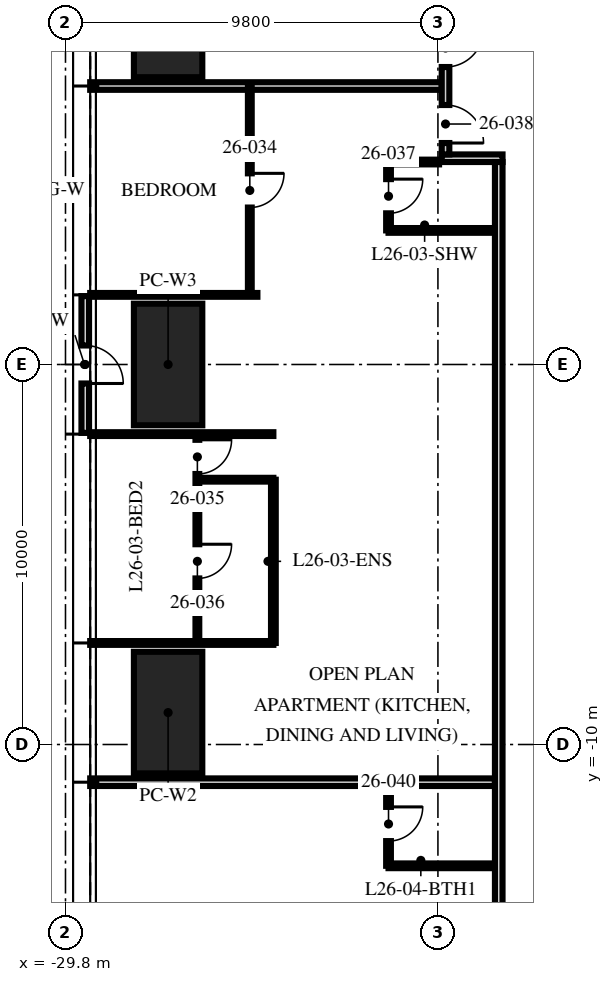
"""IFC4 building model, lengths in metres.
Left out: names, types, materials, properties, quantities, classifications, styles, units other than length and angle.
Written with IfcOpenShell. Run it as: python <this file> out.ifc"""

import sys

from ifc_helpers import new_model, si_unit, direction, frame, frame_2d, origin, origin_2d, place, context, subcontext, project, spatial, rectangle, hollow_rectangle, extrude, element, fill, save


model = new_model("IFC4")
c1 = context("Model", 3, precision=1e-05, world=origin(), true_north=direction((0.0, 1.0)))
c2 = subcontext(c1, "Body", "Model", "MODEL_VIEW")
j1 = project(units=[si_unit("LENGTHUNIT", "METRE"), si_unit("PLANEANGLEUNIT", "RADIAN")], contexts=[c1])
p1 = place(None, origin())
s1 = spatial("IfcSite", under=j1, at=p1, CompositionType="ELEMENT")
p2 = place(p1, origin())
s2 = spatial("IfcBuilding", under=s1, at=p2, CompositionType="ELEMENT")
p3 = place(p2, frame((0.0, 0.0, 107.25)))
s3 = spatial("IfcBuildingStorey", under=s2, at=p3, CompositionType="ELEMENT", Elevation=107.25)
p4 = place(p3, frame((-27.1, -9.16, -0.07), z_axis=(0.0, 0.0, 1.0), x_axis=(0.0, 1.0, 0.0)))
e1 = element("IfcColumn", 1, at=p4, inside=s3, PredefinedType="COLUMN", context=c2, shape_type="SweptSolid", body=[
    extrude(hollow_rectangle(XDim=3.2, YDim=1.8, WallThickness=0.2, at=origin_2d()), origin(), (0.0, 0.0, 1.0), 3.82),
])
p5 = place(p3, frame((-27.1, 0.0, -0.23), z_axis=(0.0, 0.0, 1.0), x_axis=(0.0, 1.0, 0.0)))
e2 = element("IfcColumn", 2, at=p5, inside=s3, PredefinedType="COLUMN", context=c2, shape_type="SweptSolid", body=[
    extrude(hollow_rectangle(XDim=3.2, YDim=1.8, WallThickness=0.2, at=origin_2d()), origin(), (0.0, 0.0, 1.0), 3.98),
])
p6 = place(p3, frame((-27.1, 9.16, -0.07), z_axis=(0.0, 0.0, 1.0), x_axis=(0.0, 1.0, 0.0)))
e3 = element("IfcColumn", 3, at=p6, inside=s3, PredefinedType="COLUMN", context=c2, shape_type="SweptSolid", body=[
    extrude(hollow_rectangle(XDim=3.2, YDim=1.8, WallThickness=0.2, at=origin_2d()), origin(), (0.0, 0.0, 1.0), 3.82),
])
p7 = place(p3, frame((-29.28, 1.8, 0.0), z_axis=(0.0, 0.0, 1.0), x_axis=(0.0, -1.0, 0.0)))
e4 = element("IfcWall", 4, at=p7, inside=s3, PredefinedType="ELEMENTEDWALL", context=c2, shape_type="SweptSolid", body=[
    extrude(rectangle(XDim=3.599, YDim=0.2, at=frame_2d((1.8, 0.0))), origin(), (0.0, 0.0, 1.0), 3.75),
])
p8 = place(p7, frame((1.3, 0.0, 0.0)))
e5 = element("IfcOpeningElement", 5, at=p8, cuts=e4, PredefinedType="OPENING", context=c2, shape_type="SweptSolid", body=[
    extrude(rectangle(XDim=1.0, YDim=2.4, at=frame_2d((0.5, 1.2))), frame((0.0, 0.11, 0.0), z_axis=(0.0, -1.0, 0.0), x_axis=(1.0, 0.0, 0.0)), (0.0, 0.0, 1.0), 0.22),
])
p9 = place(p3, frame((-19.9, 7.328, 0.0), z_axis=(0.0, 0.0, 1.0), x_axis=(-1.0, 0.0, 0.0)))
e6 = element("IfcWall", 6, at=p9, inside=s3, PredefinedType="PARTITIONING", context=c2, shape_type="SweptSolid", body=[
    extrude(rectangle(XDim=9.25, YDim=0.2, at=frame_2d((4.625, 0.0))), origin(), (0.0, 0.0, 1.0), 2.81),
])
p10 = place(p3, frame((-24.75, 1.832, 0.0), z_axis=(0.0, 0.0, 1.0), x_axis=(-1.0, 0.0, 0.0)))
e7 = element("IfcWall", 7, at=p10, inside=s3, PredefinedType="PARTITIONING", context=c2, shape_type="SweptSolid", body=[
    extrude(rectangle(XDim=4.4, YDim=0.1, at=frame_2d((2.2, 0.0))), origin(), (0.0, 0.0, 1.0), 2.81),
])
for number, where, z_axis, x_axis in (
    (8, (-24.33, -1.832, 0.0), (0.0, 0.0, 1.0), (-1.0, 0.0, 0.0)),
    (9, (-24.33, -7.328, 0.0), (0.0, 0.0, 1.0), (-1.0, 0.0, 0.0)),
):
    element("IfcWall", number, at=place(p3, frame(where, z_axis=z_axis, x_axis=x_axis)), inside=s3, PredefinedType="PARTITIONING", context=c2, shape_type="SweptSolid", body=[
        extrude(rectangle(XDim=4.82, YDim=0.1, at=frame_2d((2.41, 0.0))), origin(), (0.0, 0.0, 1.0), 2.81),
    ])
p11 = place(p3, frame((-18.5, -10.992, 0.0), z_axis=(0.0, 0.0, 1.0), x_axis=(-1.0, 0.0, 0.0)))
e10 = element("IfcWall", 10, at=p11, inside=s3, PredefinedType="PARTITIONING", context=c2, shape_type="SweptSolid", body=[
    extrude(rectangle(XDim=10.65, YDim=0.2, at=frame_2d((5.325, 0.0))), origin(), (0.0, 0.0, 1.0), 2.81),
])
p12 = place(p3, frame((-24.95, 7.328, 0.0), z_axis=(0.0, 0.0, 1.0), x_axis=(0.0, -1.0, 0.0)))
e11 = element("IfcWall", 11, at=p12, inside=s3, PredefinedType="PARTITIONING", context=c2, shape_type="SweptSolid", body=[
    extrude(rectangle(XDim=5.496, YDim=0.1, at=frame_2d((2.748, 0.0))), origin(), (0.0, 0.0, 1.0), 2.81),
])
p13 = place(p12, frame((2.298, 0.0, 0.0)))
e12 = element("IfcOpeningElement", 12, at=p13, cuts=e11, PredefinedType="OPENING", context=c2, shape_type="SweptSolid", body=[
    extrude(rectangle(XDim=0.9, YDim=2.1, at=frame_2d((0.45, 1.05))), frame((0.0, 0.06, 0.0), z_axis=(0.0, -1.0, 0.0), x_axis=(1.0, 0.0, 0.0)), (0.0, 0.0, 1.0), 0.12),
])
p14 = place(p3, frame((-26.33, -1.832, 0.0), z_axis=(0.0, 0.0, 1.0), x_axis=(0.0, -1.0, 0.0)))
e13 = element("IfcWall", 13, at=p14, inside=s3, PredefinedType="PARTITIONING", context=c2, shape_type="SweptSolid", body=[
    extrude(rectangle(XDim=5.496, YDim=0.1, at=frame_2d((2.748, 0.0))), origin(), (0.0, 0.0, 1.0), 2.81),
])
p15 = place(p14, frame((0.15, 0.0, 0.0)))
e14 = element("IfcOpeningElement", 14, at=p15, cuts=e13, PredefinedType="OPENING", context=c2, shape_type="SweptSolid", body=[
    extrude(rectangle(XDim=0.9, YDim=2.1, at=frame_2d((0.45, 1.05))), frame((0.0, 0.06, 0.0), z_axis=(0.0, -1.0, 0.0), x_axis=(1.0, 0.0, 0.0)), (0.0, 0.0, 1.0), 0.12),
])
p16 = place(p14, frame((2.898, 0.0, 0.0)))
e15 = element("IfcOpeningElement", 15, at=p16, cuts=e13, PredefinedType="OPENING", context=c2, shape_type="SweptSolid", body=[
    extrude(rectangle(XDim=0.9, YDim=2.1, at=frame_2d((0.45, 1.05))), frame((0.0, 0.06, 0.0), z_axis=(0.0, -1.0, 0.0), x_axis=(1.0, 0.0, 0.0)), (0.0, 0.0, 1.0), 0.12),
])
p17 = place(p3, frame((-24.33, -3.032, 0.0), z_axis=(0.0, 0.0, 1.0), x_axis=(-1.0, 0.0, 0.0)))
e16 = element("IfcWall", 16, at=p17, inside=s3, PredefinedType="PARTITIONING", context=c2, shape_type="SweptSolid", body=[
    extrude(rectangle(XDim=2.0, YDim=0.1, at=frame_2d((1.0, 0.0))), origin(), (0.0, 0.0, 1.0), 3.5),
])
p18 = place(p3, frame((-24.33, -3.032, 0.0), z_axis=(0.0, 0.0, 1.0), x_axis=(0.0, -1.0, 0.0)))
e17 = element("IfcWall", 17, at=p18, inside=s3, PredefinedType="PARTITIONING", context=c2, shape_type="SweptSolid", body=[
    extrude(rectangle(XDim=4.296, YDim=0.125, at=frame_2d((2.148, 0.0))), origin(), (0.0, 0.0, 1.0), 2.81),
])
p19 = place(p3, frame((-21.3, 5.328, 0.0), z_axis=(0.0, 0.0, 1.0), x_axis=(0.0, -1.0, 0.0)))
e18 = element("IfcWall", 18, at=p19, inside=s3, PredefinedType="PARTITIONING", context=c2, shape_type="SweptSolid", body=[
    extrude(rectangle(XDim=1.8, YDim=0.125, at=frame_2d((0.9, 0.0))), origin(), (0.0, 0.0, 1.0), 2.81),
])
p20 = place(p19, frame((0.45, 0.0, 0.0)))
e19 = element("IfcOpeningElement", 19, at=p20, cuts=e18, PredefinedType="OPENING", context=c2, shape_type="SweptSolid", body=[
    extrude(rectangle(XDim=0.9, YDim=2.1, at=frame_2d((0.45, 1.05))), frame((0.0, 0.073, 0.0), z_axis=(0.0, -1.0, 0.0), x_axis=(1.0, 0.0, 0.0)), (0.0, 0.0, 1.0), 0.145),
])
p21 = place(p3, frame((-19.97, 5.328, 0.0), z_axis=(0.0, 0.0, 1.0), x_axis=(-1.0, 0.0, 0.0)))
e20 = element("IfcWall", 20, at=p21, inside=s3, PredefinedType="PARTITIONING", context=c2, shape_type="SweptSolid", body=[
    extrude(rectangle(XDim=1.33, YDim=0.125, at=frame_2d((0.665, 0.0))), origin(), (0.0, 0.0, 1.0), 3.5),
])
p22 = place(p3, frame((-18.5, 3.528, 0.0), z_axis=(0.0, 0.0, 1.0), x_axis=(-1.0, 0.0, 0.0)))
e21 = element("IfcWall", 21, at=p22, inside=s3, PredefinedType="PARTITIONING", context=c2, shape_type="SweptSolid", body=[
    extrude(rectangle(XDim=2.8, YDim=0.125, at=frame_2d((1.4, 0.0))), origin(), (0.0, 0.0, 1.0), 3.5),
])
p23 = place(p3, frame((-21.3, -10.992, 0.0), z_axis=(0.0, 0.0, 1.0), x_axis=(0.0, -1.0, 0.0)))
e22 = element("IfcWall", 22, at=p23, inside=s3, PredefinedType="PARTITIONING", context=c2, shape_type="SweptSolid", body=[
    extrude(rectangle(XDim=2.2, YDim=0.125, at=frame_2d((1.1, 0.0))), origin(), (0.0, 0.0, 1.0), 3.5),
])
p24 = place(p23, frame((0.65, 0.0, 0.0)))
e23 = element("IfcOpeningElement", 23, at=p24, cuts=e22, PredefinedType="OPENING", context=c2, shape_type="SweptSolid", body=[
    extrude(rectangle(XDim=0.9, YDim=2.1, at=frame_2d((0.45, 1.05))), frame((0.0, 0.073, 0.0), z_axis=(0.0, -1.0, 0.0), x_axis=(1.0, 0.0, 0.0)), (0.0, 0.0, 1.0), 0.145),
])
p25 = place(p3, frame((-18.5, -13.192, 0.0), z_axis=(0.0, 0.0, 1.0), x_axis=(-1.0, 0.0, 0.0)))
e24 = element("IfcWall", 24, at=p25, inside=s3, PredefinedType="PARTITIONING", context=c2, shape_type="SweptSolid", body=[
    extrude(rectangle(XDim=2.8, YDim=0.125, at=frame_2d((1.4, 0.0))), origin(), (0.0, 0.0, 1.0), 3.5),
])
p26 = place(p3, frame((-18.3, 5.428, 0.0), z_axis=(0.0, 0.0, 1.0), x_axis=(-1.0, 0.0, 0.0)))
e25 = element("IfcWall", 25, at=p26, inside=s3, PredefinedType="PARTITIONING", context=c2, shape_type="SweptSolid", body=[
    extrude(rectangle(XDim=1.6, YDim=0.2, at=frame_2d((0.8, 0.0))), origin(), (0.0, 0.0, 1.0), 3.5),
])
p27 = place(p3, frame((-19.8, 9.128, 0.0), z_axis=(0.0, 0.0, 1.0), x_axis=(0.0, -1.0, 0.0)))
e26 = element("IfcWall", 26, at=p27, inside=s3, PredefinedType="PARTITIONING", context=c2, shape_type="SweptSolid", body=[
    extrude(rectangle(XDim=3.6, YDim=0.2, at=frame_2d((1.8, 0.0))), origin(), (0.0, 0.0, 1.0), 2.7),
])
p28 = place(p27, frame((0.3, 0.0, 0.0)))
e27 = element("IfcOpeningElement", 27, at=p28, cuts=e26, PredefinedType="OPENING", context=c2, shape_type="SweptSolid", body=[
    extrude(rectangle(XDim=1.0, YDim=2.2, at=frame_2d((0.5, 1.1))), frame((0.0, 0.11, 0.0), z_axis=(0.0, -1.0, 0.0), x_axis=(1.0, 0.0, 0.0)), (0.0, 0.0, 1.0), 0.22),
])
p29 = place(p27, frame((2.3, 0.0, 0.0)))
e28 = element("IfcOpeningElement", 28, at=p29, cuts=e26, PredefinedType="OPENING", context=c2, shape_type="SweptSolid", body=[
    extrude(rectangle(XDim=1.0, YDim=2.2, at=frame_2d((0.5, 1.1))), frame((0.0, 0.11, 0.0), z_axis=(0.0, -1.0, 0.0), x_axis=(1.0, 0.0, 0.0)), (0.0, 0.0, 1.0), 0.22),
])
p30 = place(p3, frame((-18.4, 5.328, 0.0), z_axis=(0.0, 0.0, 1.0), x_axis=(0.0, -1.0, 0.0)))
e29 = element("IfcWall", 29, at=p30, inside=s3, PredefinedType="PARTITIONING", context=c2, shape_type="SweptSolid", body=[
    extrude(rectangle(XDim=23.628, YDim=0.2, at=frame_2d((11.814, 0.0))), origin(), (0.0, 0.0, 1.0), 2.3),
])
p31 = place(p30, frame((21.84, 0.0, 0.0)))
e30 = element("IfcOpeningElement", 30, at=p31, cuts=e29, PredefinedType="OPENING", context=c2, shape_type="SweptSolid", body=[
    extrude(rectangle(XDim=1.0, YDim=2.2, at=frame_2d((0.5, 1.1))), frame((0.0, 0.11, 0.0), z_axis=(0.0, -1.0, 0.0), x_axis=(1.0, 0.0, 0.0)), (0.0, 0.0, 1.0), 0.22),
])
p32 = place(p8, origin())
e31 = element("IfcDoor", 31, at=p32, inside=s3, OperationType="SINGLE_SWING_LEFT", PredefinedType="DOOR", context=c2, shape_type="SweptSolid", body=[
    extrude(rectangle(XDim=1.0, YDim=2.4, at=frame_2d((0.5, 1.2))), frame((0.0, 0.025, 0.0), z_axis=(0.0, -1.0, 0.0), x_axis=(1.0, 0.0, 0.0)), (0.0, 0.0, 1.0), 0.05),
])
fill(e5, e31)
p33 = place(p28, origin())
e32 = element("IfcDoor", 32, at=p33, inside=s3, OperationType="SINGLE_SWING_LEFT", PredefinedType="DOOR", context=c2, shape_type="SweptSolid", body=[
    extrude(rectangle(XDim=1.0, YDim=2.2, at=frame_2d((0.5, 1.1))), frame((0.0, 0.025, 0.0), z_axis=(0.0, -1.0, 0.0), x_axis=(1.0, 0.0, 0.0)), (0.0, 0.0, 1.0), 0.05),
])
fill(e27, e32)
p34 = place(p13, origin())
e33 = element("IfcDoor", 33, at=p34, inside=s3, OperationType="SINGLE_SWING_LEFT", PredefinedType="DOOR", context=c2, shape_type="SweptSolid", body=[
    extrude(rectangle(XDim=0.9, YDim=2.1, at=frame_2d((0.45, 1.05))), frame((0.0, 0.025, 0.0), z_axis=(0.0, -1.0, 0.0), x_axis=(1.0, 0.0, 0.0)), (0.0, 0.0, 1.0), 0.05),
])
fill(e12, e33)
p35 = place(p15, origin())
e34 = element("IfcDoor", 34, at=p35, inside=s3, OperationType="SINGLE_SWING_LEFT", PredefinedType="DOOR", context=c2, shape_type="SweptSolid", body=[
    extrude(rectangle(XDim=0.9, YDim=2.1, at=frame_2d((0.45, 1.05))), frame((0.0, 0.025, 0.0), z_axis=(0.0, -1.0, 0.0), x_axis=(1.0, 0.0, 0.0)), (0.0, 0.0, 1.0), 0.05),
])
fill(e14, e34)
p36 = place(p16, origin())
e35 = element("IfcDoor", 35, at=p36, inside=s3, OperationType="SINGLE_SWING_LEFT", PredefinedType="DOOR", context=c2, shape_type="SweptSolid", body=[
    extrude(rectangle(XDim=0.9, YDim=2.1, at=frame_2d((0.45, 1.05))), frame((0.0, 0.025, 0.0), z_axis=(0.0, -1.0, 0.0), x_axis=(1.0, 0.0, 0.0)), (0.0, 0.0, 1.0), 0.05),
])
fill(e15, e35)
p37 = place(p20, origin())
e36 = element("IfcDoor", 36, at=p37, inside=s3, OperationType="SINGLE_SWING_LEFT", PredefinedType="DOOR", context=c2, shape_type="SweptSolid", body=[
    extrude(rectangle(XDim=0.9, YDim=2.1, at=frame_2d((0.45, 1.05))), frame((0.0, 0.025, 0.0), z_axis=(0.0, -1.0, 0.0), x_axis=(1.0, 0.0, 0.0)), (0.0, 0.0, 1.0), 0.05),
])
fill(e19, e36)
p38 = place(p29, origin())
e37 = element("IfcDoor", 37, at=p38, inside=s3, OperationType="SINGLE_SWING_RIGHT", PredefinedType="DOOR", context=c2, shape_type="SweptSolid", body=[
    extrude(rectangle(XDim=1.0, YDim=2.2, at=frame_2d((0.5, 1.1))), frame((0.0, 0.025, 0.0), z_axis=(0.0, -1.0, 0.0), x_axis=(1.0, 0.0, 0.0)), (0.0, 0.0, 1.0), 0.05),
])
fill(e28, e37)
p39 = place(p24, origin())
e38 = element("IfcDoor", 38, at=p39, inside=s3, OperationType="SINGLE_SWING_LEFT", PredefinedType="DOOR", context=c2, shape_type="SweptSolid", body=[
    extrude(rectangle(XDim=0.9, YDim=2.1, at=frame_2d((0.45, 1.05))), frame((0.0, 0.025, 0.0), z_axis=(0.0, -1.0, 0.0), x_axis=(1.0, 0.0, 0.0)), (0.0, 0.0, 1.0), 0.05),
])
fill(e23, e38)
save(model, sys.argv[1])
